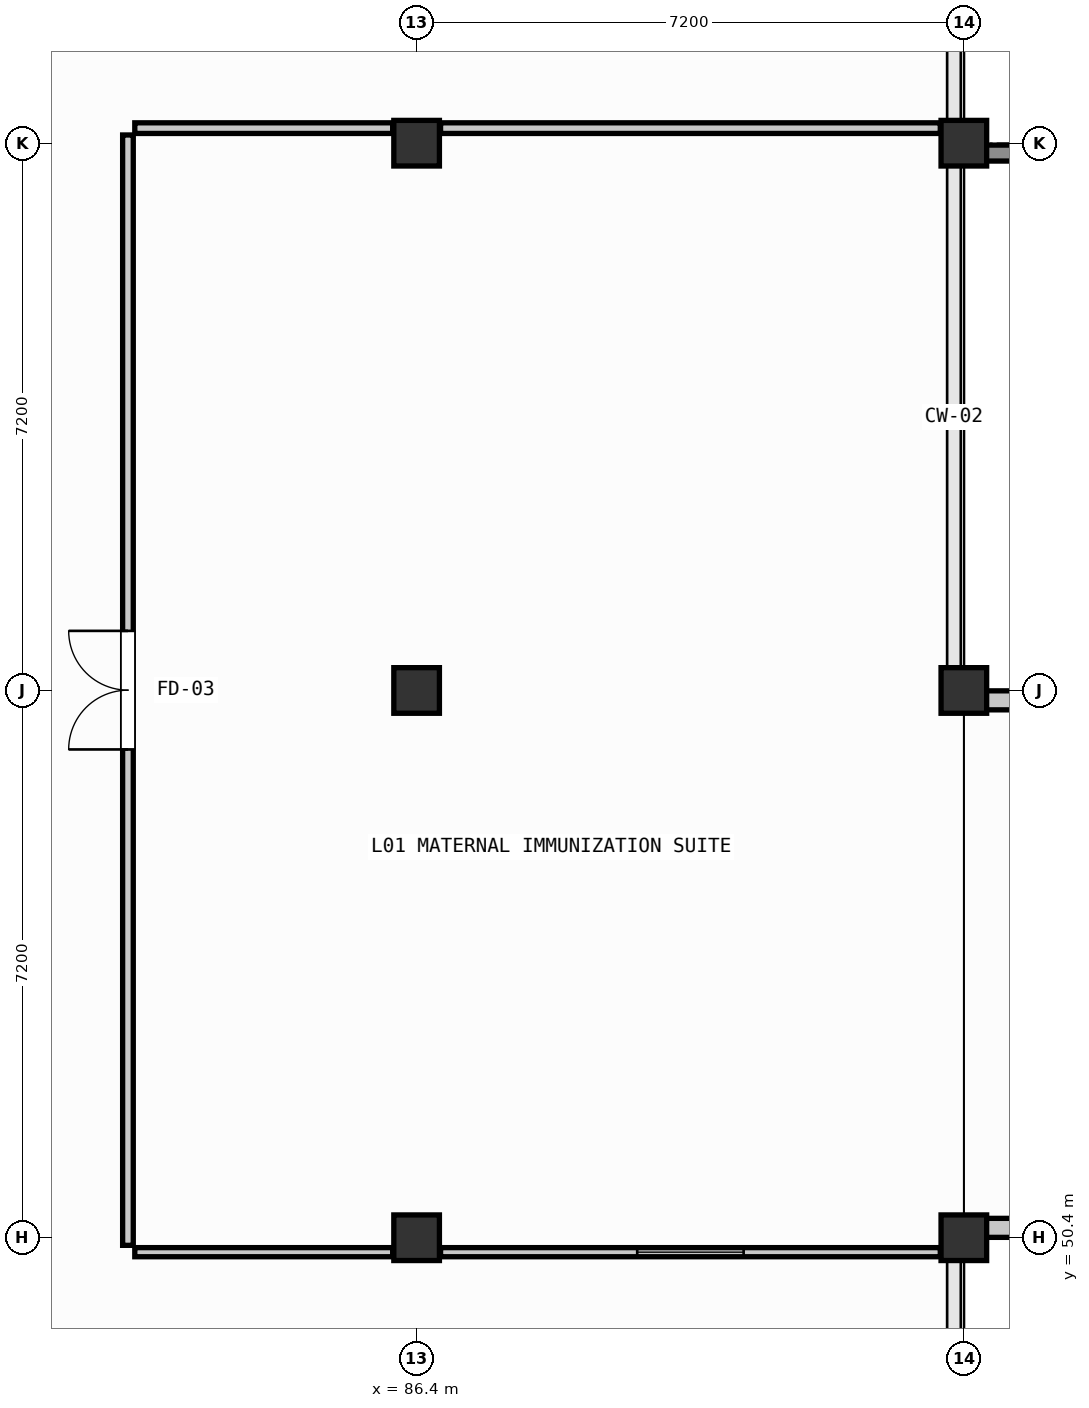
"""IFC4 building model, lengths in metres.
Left out: names, types, materials, properties, quantities, classifications, styles, units other than length and angle.
Written with IfcOpenShell. Run it as: python <this file> out.ifc"""

import sys

from ifc_helpers import new_model, si_unit, direction, frame, frame_2d, origin, origin_2d, place, context, subcontext, project, spatial, rectangle, extrude, element, fill, save


model = new_model("IFC4")
c1 = context("Model", 3, precision=1e-05, world=origin(), true_north=direction((0.0, 1.0)))
c2 = subcontext(c1, "Body", "Model", "MODEL_VIEW")
j1 = project(units=[si_unit("LENGTHUNIT", "METRE"), si_unit("PLANEANGLEUNIT", "RADIAN")], contexts=[c1])
p1 = place(None, origin())
s1 = spatial("IfcSite", under=j1, at=p1, CompositionType="ELEMENT")
p2 = place(p1, origin())
s2 = spatial("IfcBuilding", under=s1, at=p2, CompositionType="ELEMENT")
p3 = place(p2, origin())
s3 = spatial("IfcBuildingStorey", under=s2, at=p3, CompositionType="ELEMENT", Elevation=0.0)
for number, where, z_axis, x_axis in (
    (1, (86.4, 50.4, -0.25), (0.0, 0.0, 1.0), (1.0, 0.0, 0.0)),
    (2, (86.4, 57.6, -0.25), (0.0, 0.0, 1.0), (1.0, 0.0, 0.0)),
    (3, (86.4, 64.8, -0.25), (0.0, 0.0, 1.0), (1.0, 0.0, 0.0)),
):
    element("IfcColumn", number, at=place(p3, frame(where, z_axis=z_axis, x_axis=x_axis)), inside=s3, PredefinedType="COLUMN", context=c2, shape_type="SweptSolid", body=[
        extrude(rectangle(XDim=0.6, YDim=0.6, at=origin_2d()), origin(), (0.0, 0.0, 1.0), 4.81),
    ])
for number, where, z_axis, x_axis in (
    (4, (93.6, 50.4, -0.25), (0.0, 0.0, 1.0), (1.0, 0.0, 0.0)),
    (5, (93.6, 57.6, -0.25), (0.0, 0.0, 1.0), (1.0, 0.0, 0.0)),
):
    element("IfcColumn", number, at=place(p3, frame(where, z_axis=z_axis, x_axis=x_axis)), inside=s3, PredefinedType="COLUMN", context=c2, shape_type="SweptSolid", body=[
        extrude(rectangle(XDim=0.6, YDim=0.6, at=origin_2d()), origin(), (0.0, 0.0, 1.0), 4.83),
    ])
p4 = place(p3, frame((93.6, 64.8, -0.25), z_axis=(0.0, 0.0, 1.0), x_axis=(1.0, 0.0, 0.0)))
e6 = element("IfcColumn", 6, at=p4, inside=s3, PredefinedType="COLUMN", context=c2, shape_type="SweptSolid", body=[
    extrude(rectangle(XDim=0.6, YDim=0.6, at=origin_2d()), origin(), (0.0, 0.0, 1.0), 4.81),
])
p5 = place(p3, frame((93.895, 57.47, 0.0), z_axis=(0.0, 0.0, 1.0), x_axis=(1.0, 0.0, 0.0)))
e7 = element("IfcWall", 7, at=p5, inside=s3, PredefinedType="SOLIDWALL", context=c2, shape_type="SweptSolid", body=[
    extrude(rectangle(XDim=6.61, YDim=0.25, at=frame_2d((3.305, 0.0))), origin(), (0.0, 0.0, 1.0), 3.88),
])
p6 = place(p5, frame((2.33, 0.0, 0.95)))
e8 = element("IfcOpeningElement", 8, at=p6, cuts=e7, PredefinedType="OPENING", context=c2, shape_type="SweptSolid", body=[
    extrude(rectangle(XDim=1.95, YDim=1.25, at=frame_2d((0.975, 0.625))), frame((0.0, 0.135, 0.0), z_axis=(0.0, -1.0, 0.0), x_axis=(1.0, 0.0, 0.0)), (0.0, 0.0, 1.0), 0.27),
])
p7 = place(p3, frame((100.505, 50.53, 0.0), z_axis=(0.0, 0.0, 1.0), x_axis=(-1.0, 0.0, 0.0)))
e9 = element("IfcWall", 9, at=p7, inside=s3, PredefinedType="SOLIDWALL", context=c2, shape_type="SweptSolid", body=[
    extrude(rectangle(XDim=6.61, YDim=0.25, at=frame_2d((3.305, 0.0))), origin(), (0.0, 0.0, 1.0), 3.88),
])
p8 = place(p7, frame((2.33, 0.0, 0.95)))
e10 = element("IfcOpeningElement", 10, at=p8, cuts=e9, PredefinedType="OPENING", context=c2, shape_type="SweptSolid", body=[
    extrude(rectangle(XDim=1.95, YDim=1.55, at=frame_2d((0.975, 0.775))), frame((0.0, 0.135, 0.0), z_axis=(0.0, -1.0, 0.0), x_axis=(1.0, 0.0, 0.0)), (0.0, 0.0, 1.0), 0.27),
])
p9 = place(p3, frame((93.82, 64.67, 0.0), z_axis=(0.0, 0.0, 1.0), x_axis=(1.0, 0.0, 0.0)))
e11 = element("IfcWall", 11, at=p9, inside=s3, PredefinedType="SOLIDWALL", context=c2, shape_type="SweptSolid", body=[
    extrude(rectangle(XDim=6.76, YDim=0.21, at=frame_2d((3.38, 0.0))), origin(), (0.0, 0.0, 1.0), 2.35),
])
p10 = place(p9, frame((2.58, 0.0, 0.0)))
e12 = element("IfcOpeningElement", 12, at=p10, cuts=e11, PredefinedType="OPENING", context=c2, shape_type="SweptSolid", body=[
    extrude(rectangle(XDim=1.6, YDim=2.05, at=frame_2d((0.8, 1.025))), frame((0.0, 0.115, 0.0), z_axis=(0.0, -1.0, 0.0), x_axis=(1.0, 0.0, 0.0)), (0.0, 0.0, 1.0), 0.23),
])
p11 = place(p3, frame((93.29, 50.21, 0.0), z_axis=(0.0, 0.0, 1.0), x_axis=(-1.0, 0.0, 0.0)))
e13 = element("IfcWall", 13, at=p11, inside=s3, PredefinedType="PARTITIONING", context=c2, shape_type="SweptSolid", body=[
    extrude(rectangle(XDim=6.575, YDim=0.12, at=frame_2d((3.288, 0.0))), origin(), (0.0, 0.0, 1.0), 3.76),
])
p12 = place(p11, frame((2.587, 0.0, 1.15)))
e14 = element("IfcOpeningElement", 14, at=p12, cuts=e13, PredefinedType="OPENING", context=c2, shape_type="SweptSolid", body=[
    extrude(rectangle(XDim=1.4, YDim=1.05, at=frame_2d((0.7, 0.525))), frame((0.0, 0.07, 0.0), z_axis=(0.0, -1.0, 0.0), x_axis=(1.0, 0.0, 0.0)), (0.0, 0.0, 1.0), 0.14),
])
p13 = place(p3, frame((86.085, 50.21, 0.0), z_axis=(0.0, 0.0, 1.0), x_axis=(-1.0, 0.0, 0.0)))
e15 = element("IfcWall", 15, at=p13, inside=s3, PredefinedType="PARTITIONING", context=c2, shape_type="SweptSolid", body=[
    extrude(rectangle(XDim=3.393, YDim=0.12, at=frame_2d((1.697, 0.0))), origin(), (0.0, 0.0, 1.0), 3.76),
])
p14 = place(p3, frame((82.602, 50.3, 0.0), z_axis=(0.0, 0.0, 1.0), x_axis=(0.0, 1.0, 0.0)))
e16 = element("IfcWall", 16, at=p14, inside=s3, PredefinedType="PARTITIONING", context=c2, shape_type="SweptSolid", body=[
    extrude(rectangle(XDim=14.608, YDim=0.14, at=frame_2d((7.304, 0.0))), origin(), (0.0, 0.0, 1.0), 3.76),
])
p15 = place(p14, frame((6.524, 0.0, 0.0)))
e17 = element("IfcOpeningElement", 17, at=p15, cuts=e16, PredefinedType="OPENING", context=c2, shape_type="SweptSolid", body=[
    extrude(rectangle(XDim=1.56, YDim=2.22, at=frame_2d((0.78, 1.11))), frame((0.0, 0.08, 0.0), z_axis=(0.0, -1.0, 0.0), x_axis=(1.0, 0.0, 0.0)), (0.0, 0.0, 1.0), 0.16),
])
p16 = place(p3, frame((82.692, 64.998, 0.0), z_axis=(0.0, 0.0, 1.0), x_axis=(1.0, 0.0, 0.0)))
e18 = element("IfcWall", 18, at=p16, inside=s3, PredefinedType="PARTITIONING", context=c2, shape_type="SweptSolid", body=[
    extrude(rectangle(XDim=3.393, YDim=0.14, at=frame_2d((1.697, 0.0))), origin(), (0.0, 0.0, 1.0), 3.76),
])
p17 = place(p3, frame((86.715, 64.998, 0.0), z_axis=(0.0, 0.0, 1.0), x_axis=(1.0, 0.0, 0.0)))
e19 = element("IfcWall", 19, at=p17, inside=s3, PredefinedType="PARTITIONING", context=c2, shape_type="SweptSolid", body=[
    extrude(rectangle(XDim=6.575, YDim=0.14, at=frame_2d((3.288, 0.0))), origin(), (0.0, 0.0, 1.0), 3.76),
])
p18 = place(p15, origin())
e20 = element("IfcDoor", 20, at=p18, inside=s3, OperationType="DOUBLE_DOOR_SINGLE_SWING", PredefinedType="DOOR", context=c2, shape_type="SweptSolid", body=[
    extrude(rectangle(XDim=1.56, YDim=2.22, at=frame_2d((0.78, 1.11))), frame((0.0, 0.025, 0.0), z_axis=(0.0, -1.0, 0.0), x_axis=(1.0, 0.0, 0.0)), (0.0, 0.0, 1.0), 0.05),
])
fill(e17, e20)
p19 = place(p12, origin())
e21 = element("IfcWindow", 21, at=p19, inside=s3, PartitioningType="SINGLE_PANEL", PredefinedType="WINDOW", context=c2, shape_type="SweptSolid", body=[
    extrude(rectangle(XDim=1.4, YDim=1.05, at=frame_2d((0.7, 0.525))), frame((0.0, 0.03, 0.0), z_axis=(0.0, -1.0, 0.0), x_axis=(1.0, 0.0, 0.0)), (0.0, 0.0, 1.0), 0.06),
])
fill(e14, e21)
save(model, sys.argv[1])
